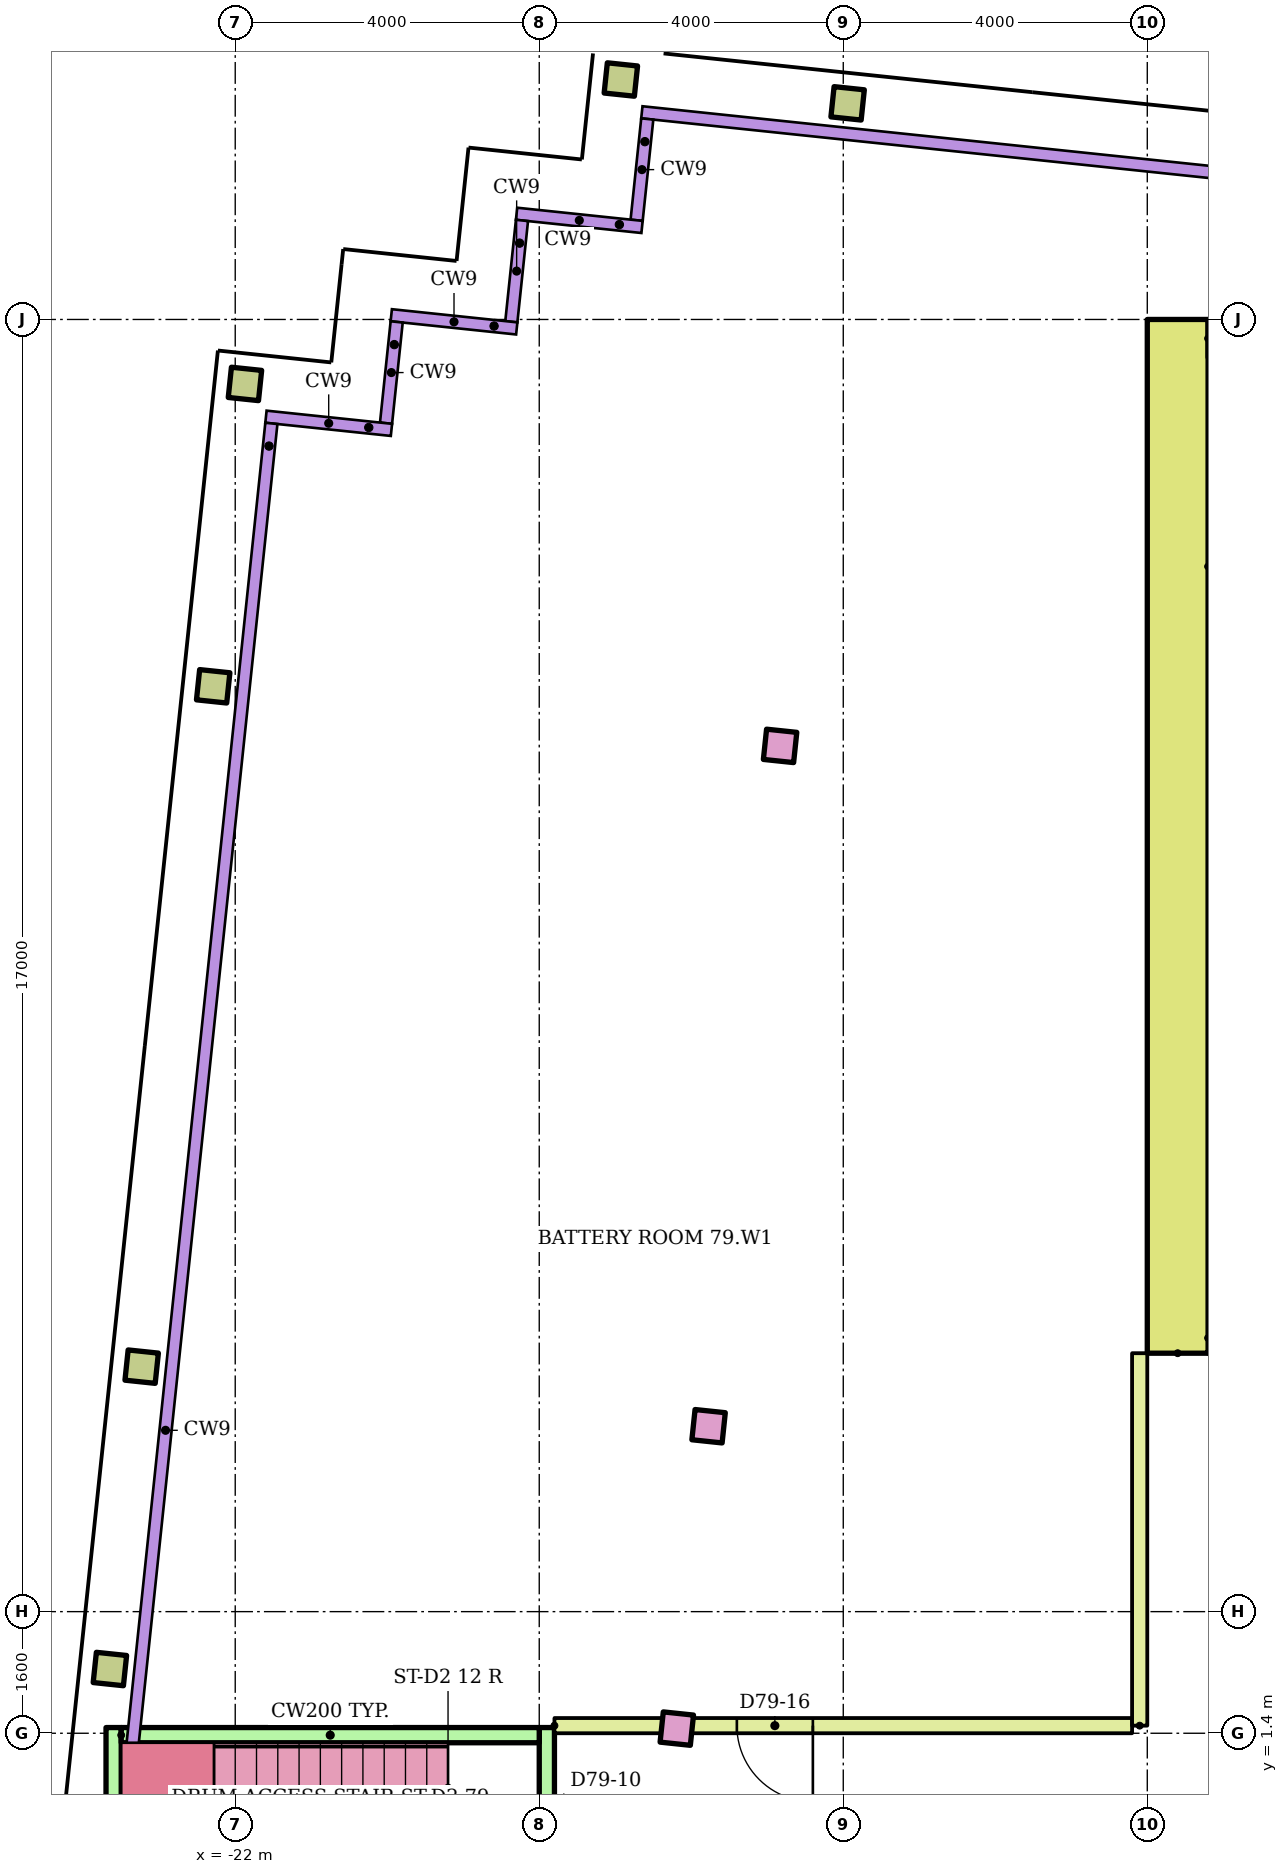
"""IFC4 building model, lengths in metres.
Left out: names, types, materials, properties, quantities, classifications, styles, units other than length and angle.
Written with IfcOpenShell. Run it as: python <this file> out.ifc"""

import sys

from ifc_helpers import new_model, si_unit, direction, frame, frame_2d, origin, origin_2d, place, context, subcontext, project, spatial, rectangle, hollow_rectangle, extrude, element, fill, save


model = new_model("IFC4")
c1 = context("Model", 3, precision=1e-05, world=origin(), true_north=direction((0.0, 1.0)))
c2 = subcontext(c1, "Body", "Model", "MODEL_VIEW")
j1 = project(units=[si_unit("LENGTHUNIT", "METRE"), si_unit("PLANEANGLEUNIT", "RADIAN")], contexts=[c1])
p1 = place(None, origin())
s1 = spatial("IfcSite", under=j1, at=p1, CompositionType="ELEMENT")
p2 = place(p1, origin())
s2 = spatial("IfcBuilding", under=s1, at=p2, CompositionType="ELEMENT")
p3 = place(p2, frame((0.0, 0.0, 309.2)))
s3 = spatial("IfcBuildingStorey", under=s2, at=p3, CompositionType="ELEMENT", Elevation=309.2)
p4 = place(p3, frame((-23.649, 2.245, 0.0), z_axis=(0.0, 0.0, 1.0), x_axis=(0.994521895368, -0.104528463268, 0.0)))
e1 = element("IfcColumn", 1, at=p4, inside=s3, PredefinedType="COLUMN", context=c2, shape_type="SweptSolid", body=[
    extrude(hollow_rectangle(XDim=0.4, YDim=0.4, WallThickness=0.02, at=origin_2d()), origin(), (0.0, 0.0, 1.0), 3.78),
])
p5 = place(p3, frame((-16.19, 1.461, 0.0), z_axis=(0.0, 0.0, 1.0), x_axis=(0.994521895368, -0.104528463268, 0.0)))
e2 = element("IfcColumn", 2, at=p5, inside=s3, PredefinedType="COLUMN", context=c2, shape_type="SweptSolid", body=[
    extrude(rectangle(XDim=0.4, YDim=0.4, at=origin_2d()), origin(), (0.0, 0.0, 1.0), 3.78),
])
p6 = place(p3, frame((-23.231, 6.223, 0.0), z_axis=(0.0, 0.0, 1.0), x_axis=(0.994521895368, -0.104528463268, 0.0)))
e3 = element("IfcColumn", 3, at=p6, inside=s3, PredefinedType="COLUMN", context=c2, shape_type="SweptSolid", body=[
    extrude(hollow_rectangle(XDim=0.4, YDim=0.4, WallThickness=0.02, at=origin_2d()), origin(), (0.0, 0.0, 1.0), 3.78),
])
p7 = place(p3, frame((-15.772, 5.439, 0.0), z_axis=(0.0, 0.0, 1.0), x_axis=(0.994521895368, -0.104528463268, 0.0)))
e4 = element("IfcColumn", 4, at=p7, inside=s3, PredefinedType="COLUMN", context=c2, shape_type="SweptSolid", body=[
    extrude(rectangle(XDim=0.4, YDim=0.4, at=origin_2d()), origin(), (0.0, 0.0, 1.0), 3.78),
])
p8 = place(p3, frame((-22.29, 15.174, 0.0), z_axis=(0.0, 0.0, 1.0), x_axis=(0.994521895368, -0.104528463268, 0.0)))
e5 = element("IfcColumn", 5, at=p8, inside=s3, PredefinedType="COLUMN", context=c2, shape_type="SweptSolid", body=[
    extrude(hollow_rectangle(XDim=0.4, YDim=0.4, WallThickness=0.02, at=origin_2d()), origin(), (0.0, 0.0, 1.0), 3.78),
])
p9 = place(p3, frame((-14.831, 14.39, 0.0), z_axis=(0.0, 0.0, 1.0), x_axis=(0.994521895368, -0.104528463268, 0.0)))
e6 = element("IfcColumn", 6, at=p9, inside=s3, PredefinedType="COLUMN", context=c2, shape_type="SweptSolid", body=[
    extrude(rectangle(XDim=0.4, YDim=0.4, at=origin_2d()), origin(), (0.0, 0.0, 1.0), 3.78),
])
for number, where, z_axis, x_axis in (
    (7, (-21.872, 19.152, 0.0), (0.0, 0.0, 1.0), (0.995, -0.105, 0.0)),
    (8, (-16.926, 23.157, 0.0), (0.0, 0.0, 1.0), (0.995, -0.105, 0.0)),
    (9, (-13.943, 22.843, 0.0), (0.0, 0.0, 1.0), (0.995, -0.105, 0.0)),
):
    element("IfcColumn", number, at=place(p3, frame(where, z_axis=z_axis, x_axis=x_axis)), inside=s3, PredefinedType="COLUMN", context=c2, shape_type="SweptSolid", body=[
        extrude(hollow_rectangle(XDim=0.4, YDim=0.4, WallThickness=0.02, at=origin_2d()), origin(), (0.0, 0.0, 1.0), 3.78),
    ])
p10 = place(p3, frame((-9.6, 6.4, 0.0), z_axis=(0.0, 0.0, 1.0), x_axis=(0.0, 1.0, 0.0)))
e10 = element("IfcWall", 10, at=p10, inside=s3, PredefinedType="SHEAR", context=c2, shape_type="SweptSolid", body=[
    extrude(rectangle(XDim=13.6, YDim=0.8, at=frame_2d((6.8, 0.0))), origin(), (0.0, 0.0, 1.0), 3.78),
])
p11 = place(p3, frame((-17.8, 1.5, 0.0)))
e11 = element("IfcWall", 11, at=p11, inside=s3, PredefinedType="PARTITIONING", context=c2, shape_type="SweptSolid", body=[
    extrude(rectangle(XDim=7.6, YDim=0.2, at=frame_2d((3.8, 0.0))), origin(), (0.0, 0.0, 1.0), 3.78),
])
p12 = place(p11, frame((2.4, 0.0, 0.0)))
e12 = element("IfcOpeningElement", 12, at=p12, cuts=e11, PredefinedType="OPENING", context=c2, shape_type="SweptSolid", body=[
    extrude(rectangle(XDim=1.0, YDim=2.4, at=frame_2d((0.5, 1.2))), frame((0.0, 0.11, 0.0), z_axis=(0.0, -1.0, 0.0), x_axis=(1.0, 0.0, 0.0)), (0.0, 0.0, 1.0), 0.22),
])
p13 = place(p3, frame((-10.1, 1.5, 0.0), z_axis=(0.0, 0.0, 1.0), x_axis=(0.0, 1.0, 0.0)))
e13 = element("IfcWall", 13, at=p13, inside=s3, PredefinedType="PARTITIONING", context=c2, shape_type="SweptSolid", body=[
    extrude(rectangle(XDim=4.9, YDim=0.2, at=frame_2d((2.45, 0.0))), origin(), (0.0, 0.0, 1.0), 3.78),
])
p14 = place(p3, frame((-17.9, -1.475, 0.0), z_axis=(0.0, 0.0, 1.0), x_axis=(0.0, 1.0, 0.0)))
e14 = element("IfcWall", 14, at=p14, inside=s3, PredefinedType="SHEAR", context=c2, shape_type="SweptSolid", body=[
    extrude(rectangle(XDim=2.95, YDim=0.2, at=frame_2d((1.475, 0.0))), origin(), (0.0, 0.0, 1.0), 3.78),
])
p15 = place(p14, frame((1.0, 0.0, 0.0)))
e15 = element("IfcOpeningElement", 15, at=p15, cuts=e14, PredefinedType="OPENING", context=c2, shape_type="SweptSolid", body=[
    extrude(rectangle(XDim=0.95, YDim=2.1, at=frame_2d((0.475, 1.05))), frame((0.0, 0.11, 0.0), z_axis=(0.0, -1.0, 0.0), x_axis=(1.0, 0.0, 0.0)), (0.0, 0.0, 1.0), 0.22),
])
p16 = place(p3, frame((-23.6, -1.475, 0.0), z_axis=(0.0, 0.0, 1.0), x_axis=(0.0, 1.0, 0.0)))
e16 = element("IfcWall", 16, at=p16, inside=s3, PredefinedType="SHEAR", context=c2, shape_type="SweptSolid", body=[
    extrude(rectangle(XDim=2.95, YDim=0.2, at=frame_2d((1.475, 0.0))), origin(), (0.0, 0.0, 1.0), 3.78),
])
p17 = place(p3, frame((-23.5, 1.375, 0.0)))
e17 = element("IfcWall", 17, at=p17, inside=s3, PredefinedType="SHEAR", context=c2, shape_type="SweptSolid", body=[
    extrude(rectangle(XDim=5.5, YDim=0.2, at=frame_2d((2.75, 0.0))), origin(), (0.0, 0.0, 1.0), 3.78),
])
p18 = place(p12, frame((1.0, 0.0, 0.0), z_axis=(0.0, 0.0, 1.0), x_axis=(-1.0, 0.0, 0.0)))
e18 = element("IfcDoor", 18, at=p18, inside=s3, OperationType="SINGLE_SWING_RIGHT", PredefinedType="DOOR", context=c2, shape_type="SweptSolid", body=[
    extrude(rectangle(XDim=1.0, YDim=2.4, at=frame_2d((0.5, 1.2))), frame((0.0, 0.025, 0.0), z_axis=(0.0, -1.0, 0.0), x_axis=(1.0, 0.0, 0.0)), (0.0, 0.0, 1.0), 0.05),
])
fill(e12, e18)
save(model, sys.argv[1])
